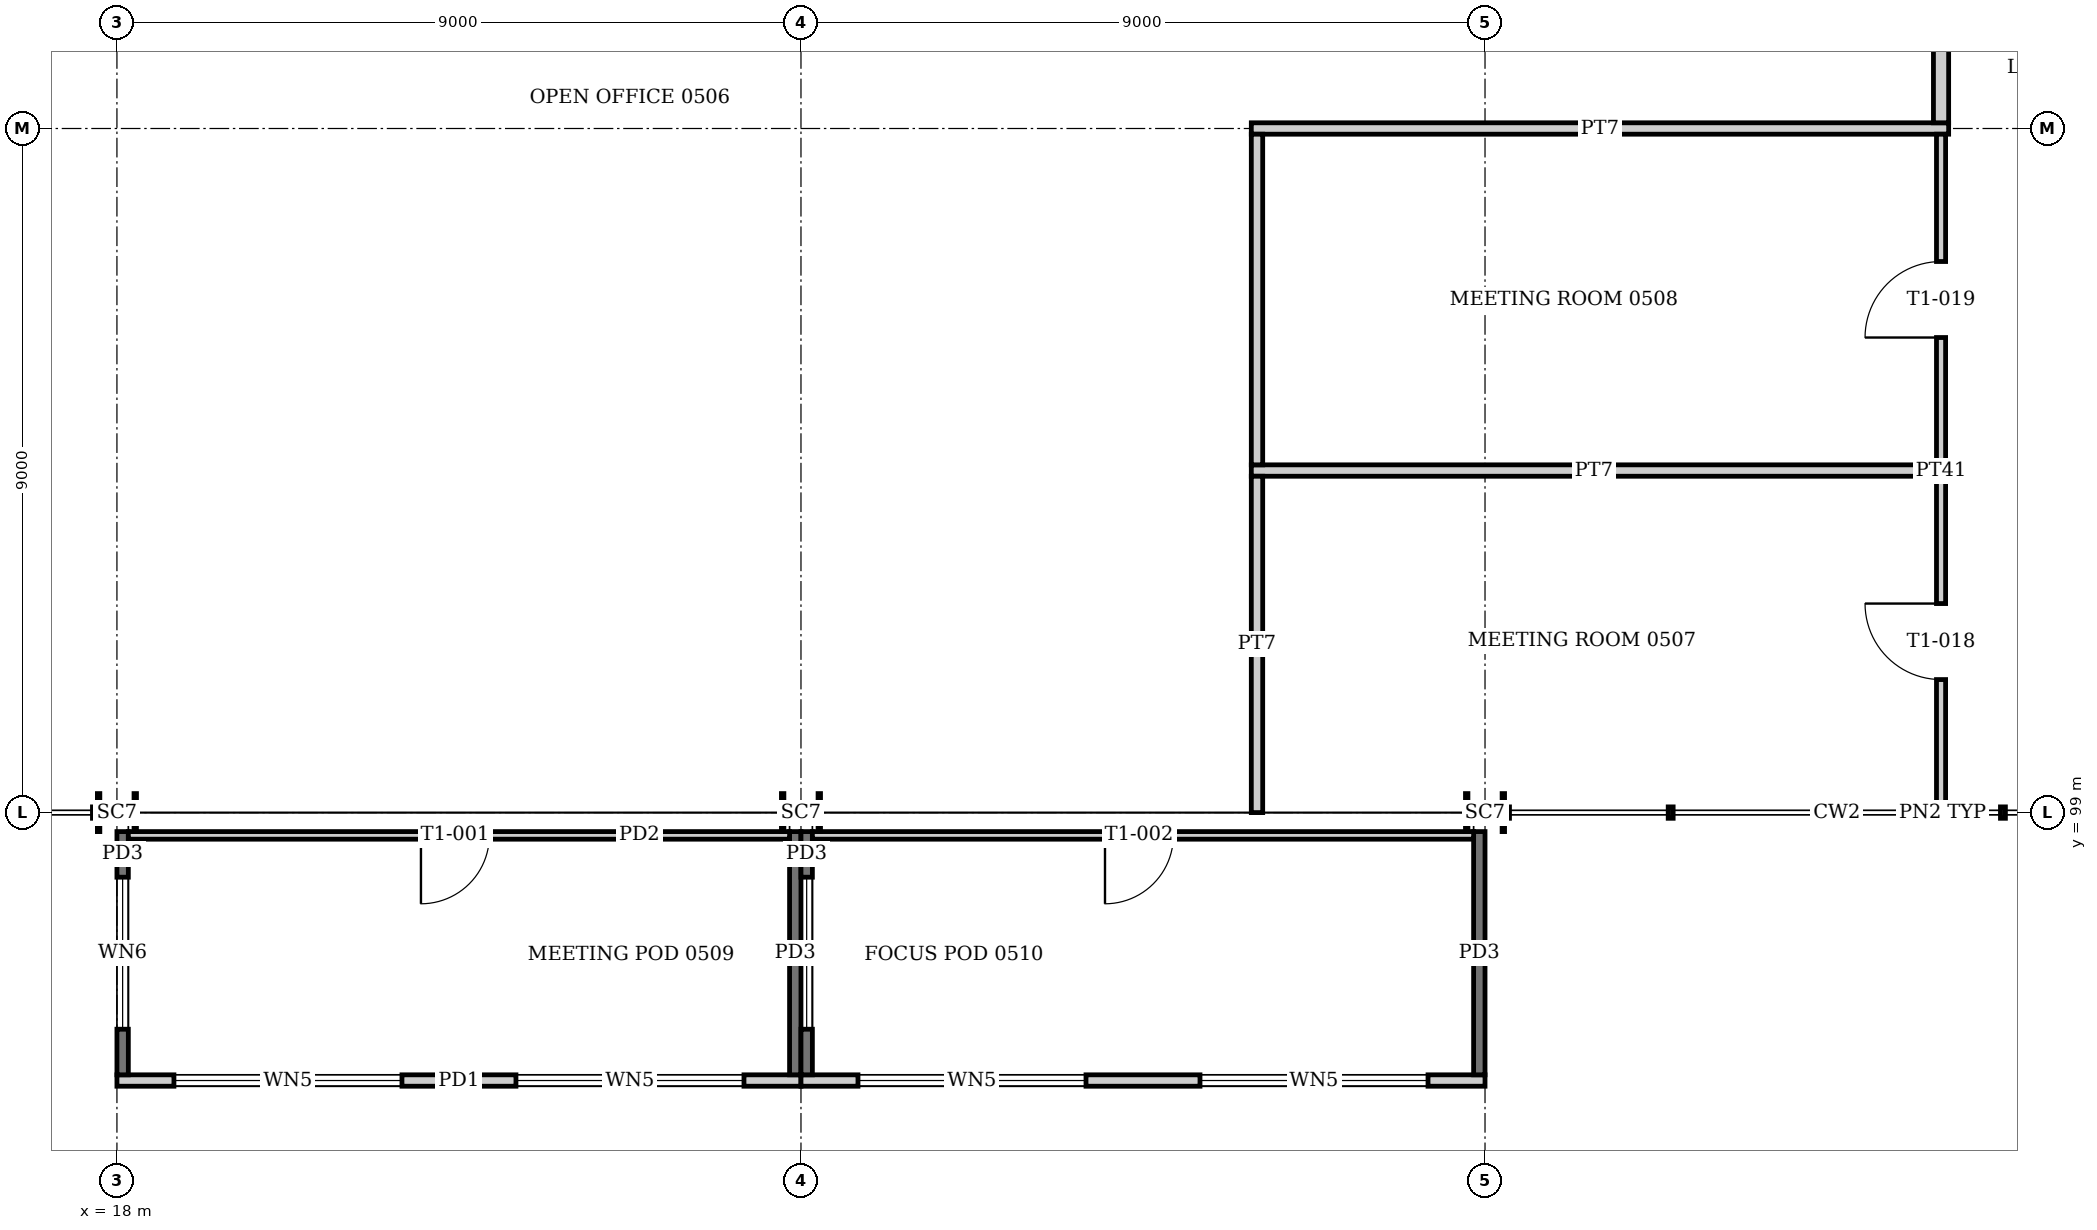
"""IFC4 building model, lengths in metres.
Left out: names, types, materials, properties, quantities, classifications, styles, units other than length and angle.
Written with IfcOpenShell. Run it as: python <this file> out.ifc"""

import sys

from ifc_helpers import new_model, si_unit, direction, frame, frame_2d, origin, origin_2d, place, context, subcontext, project, spatial, rectangle, i_section, extrude, element, fill, save


model = new_model("IFC4")
c1 = context("Model", 3, precision=1e-05, world=origin(), true_north=direction((0.0, 1.0)))
c2 = subcontext(c1, "Body", "Model", "MODEL_VIEW")
j1 = project(units=[si_unit("LENGTHUNIT", "METRE"), si_unit("PLANEANGLEUNIT", "RADIAN")], contexts=[c1])
p1 = place(None, origin())
s1 = spatial("IfcSite", under=j1, at=p1, CompositionType="ELEMENT")
p2 = place(p1, origin())
s2 = spatial("IfcBuilding", under=s1, at=p2, CompositionType="ELEMENT")
p3 = place(p2, frame((0.0, 0.0, 23.2)))
s3 = spatial("IfcBuildingStorey", under=s2, at=p3, CompositionType="ELEMENT", Elevation=23.2)
for number, where, z_axis, x_axis in (
    (1, (18.0, 99.0, 0.0), (0.0, 0.0, 1.0), (0.0, 1.0, 0.0)),
    (2, (27.0, 99.0, 0.0), (0.0, 0.0, 1.0), (0.0, 1.0, 0.0)),
    (3, (36.0, 99.0, 0.0), (0.0, 0.0, 1.0), (0.0, 1.0, 0.0)),
):
    element("IfcColumn", number, at=place(p3, frame(where, z_axis=z_axis, x_axis=x_axis)), inside=s3, PredefinedType="COLUMN", context=c2, shape_type="SweptSolid", body=[
        extrude(i_section(OverallWidth=0.5, OverallDepth=0.514, WebThickness=0.025, FlangeThickness=0.032, at=origin_2d()), origin(), (0.0, 0.0, 1.0), 4.0),
    ])
p4 = place(p3, frame((18.0, 95.475, 0.0), z_axis=(0.0, 0.0, 1.0), x_axis=(1.0, 0.0, 0.0)))
e4 = element("IfcWall", 4, at=p4, inside=s3, PredefinedType="SOLIDWALL", context=c2, shape_type="SweptSolid", body=[
    extrude(rectangle(XDim=9.0, YDim=0.15, at=frame_2d((4.5, 0.0))), origin(), (0.0, 0.0, 1.0), 2.6),
])
p5 = place(p4, frame((0.75, 0.0, 0.9)))
e5 = element("IfcOpeningElement", 5, at=p5, cuts=e4, PredefinedType="OPENING", context=c2, shape_type="SweptSolid", body=[
    extrude(rectangle(XDim=3.0, YDim=1.4, at=frame_2d((1.5, 0.7))), frame((0.0, 0.085, 0.0), z_axis=(0.0, -1.0, 0.0), x_axis=(1.0, 0.0, 0.0)), (0.0, 0.0, 1.0), 0.17),
])
p6 = place(p4, frame((5.25, 0.0, 0.9)))
e6 = element("IfcOpeningElement", 6, at=p6, cuts=e4, PredefinedType="OPENING", context=c2, shape_type="SweptSolid", body=[
    extrude(rectangle(XDim=3.0, YDim=1.4, at=frame_2d((1.5, 0.7))), frame((0.0, 0.085, 0.0), z_axis=(0.0, -1.0, 0.0), x_axis=(1.0, 0.0, 0.0)), (0.0, 0.0, 1.0), 0.17),
])
p7 = place(p3, frame((18.075, 95.55, -0.15), z_axis=(0.0, 0.0, 1.0), x_axis=(0.0, 1.0, 0.0)))
e7 = element("IfcWall", 7, at=p7, inside=s3, PredefinedType="SOLIDWALL", context=c2, shape_type="SweptSolid", body=[
    extrude(rectangle(XDim=3.2, YDim=0.15, at=frame_2d((1.6, 0.0))), origin(), (0.0, 0.0, 1.0), 2.75),
])
p8 = place(p7, frame((0.6, 0.0, 1.05)))
e8 = element("IfcOpeningElement", 8, at=p8, cuts=e7, PredefinedType="OPENING", context=c2, shape_type="SweptSolid", body=[
    extrude(rectangle(XDim=2.0, YDim=1.4, at=frame_2d((1.0, 0.7))), frame((0.0, 0.085, 0.0), z_axis=(0.0, -1.0, 0.0), x_axis=(1.0, 0.0, 0.0)), (0.0, 0.0, 1.0), 0.17),
])
p9 = place(p3, frame((26.925, 95.55, -0.15), z_axis=(0.0, 0.0, 1.0), x_axis=(0.0, 1.0, 0.0)))
e9 = element("IfcWall", 9, at=p9, inside=s3, PredefinedType="SOLIDWALL", context=c2, shape_type="SweptSolid", body=[
    extrude(rectangle(XDim=3.2, YDim=0.15, at=frame_2d((1.6, 0.0))), origin(), (0.0, 0.0, 1.0), 2.75),
])
p10 = place(p3, frame((18.15, 98.7, 0.0), z_axis=(0.0, 0.0, 1.0), x_axis=(1.0, 0.0, 0.0)))
e10 = element("IfcWall", 10, at=p10, inside=s3, PredefinedType="PARTITIONING", context=c2, shape_type="SweptSolid", body=[
    extrude(rectangle(XDim=8.7, YDim=0.1, at=frame_2d((4.35, 0.0))), origin(), (0.0, 0.0, 1.0), 2.6),
])
p11 = place(p10, frame((3.85, 0.0, 0.0)))
e11 = element("IfcOpeningElement", 11, at=p11, cuts=e10, PredefinedType="OPENING", context=c2, shape_type="SweptSolid", body=[
    extrude(rectangle(XDim=0.9, YDim=2.1, at=frame_2d((0.45, 1.05))), frame((0.0, 0.06, 0.0), z_axis=(0.0, -1.0, 0.0), x_axis=(1.0, 0.0, 0.0)), (0.0, 0.0, 1.0), 0.12),
])
p12 = place(p3, frame((27.0, 95.475, 0.0), z_axis=(0.0, 0.0, 1.0), x_axis=(1.0, 0.0, 0.0)))
e12 = element("IfcWall", 12, at=p12, inside=s3, PredefinedType="SOLIDWALL", context=c2, shape_type="SweptSolid", body=[
    extrude(rectangle(XDim=9.0, YDim=0.15, at=frame_2d((4.5, 0.0))), origin(), (0.0, 0.0, 1.0), 2.6),
])
p13 = place(p12, frame((0.75, 0.0, 0.9)))
e13 = element("IfcOpeningElement", 13, at=p13, cuts=e12, PredefinedType="OPENING", context=c2, shape_type="SweptSolid", body=[
    extrude(rectangle(XDim=3.0, YDim=1.4, at=frame_2d((1.5, 0.7))), frame((0.0, 0.085, 0.0), z_axis=(0.0, -1.0, 0.0), x_axis=(1.0, 0.0, 0.0)), (0.0, 0.0, 1.0), 0.17),
])
p14 = place(p12, frame((5.25, 0.0, 0.9)))
e14 = element("IfcOpeningElement", 14, at=p14, cuts=e12, PredefinedType="OPENING", context=c2, shape_type="SweptSolid", body=[
    extrude(rectangle(XDim=3.0, YDim=1.4, at=frame_2d((1.5, 0.7))), frame((0.0, 0.085, 0.0), z_axis=(0.0, -1.0, 0.0), x_axis=(1.0, 0.0, 0.0)), (0.0, 0.0, 1.0), 0.17),
])
p15 = place(p3, frame((27.075, 95.55, -0.15), z_axis=(0.0, 0.0, 1.0), x_axis=(0.0, 1.0, 0.0)))
e15 = element("IfcWall", 15, at=p15, inside=s3, PredefinedType="SOLIDWALL", context=c2, shape_type="SweptSolid", body=[
    extrude(rectangle(XDim=3.2, YDim=0.15, at=frame_2d((1.6, 0.0))), origin(), (0.0, 0.0, 1.0), 2.75),
])
p16 = place(p15, frame((0.6, 0.0, 1.05)))
e16 = element("IfcOpeningElement", 16, at=p16, cuts=e15, PredefinedType="OPENING", context=c2, shape_type="SweptSolid", body=[
    extrude(rectangle(XDim=2.0, YDim=1.4, at=frame_2d((1.0, 0.7))), frame((0.0, 0.085, 0.0), z_axis=(0.0, -1.0, 0.0), x_axis=(1.0, 0.0, 0.0)), (0.0, 0.0, 1.0), 0.17),
])
p17 = place(p3, frame((35.925, 95.55, -0.15), z_axis=(0.0, 0.0, 1.0), x_axis=(0.0, 1.0, 0.0)))
e17 = element("IfcWall", 17, at=p17, inside=s3, PredefinedType="SOLIDWALL", context=c2, shape_type="SweptSolid", body=[
    extrude(rectangle(XDim=3.2, YDim=0.15, at=frame_2d((1.6, 0.0))), origin(), (0.0, 0.0, 1.0), 2.75),
])
p18 = place(p3, frame((27.15, 98.7, 0.0), z_axis=(0.0, 0.0, 1.0), x_axis=(1.0, 0.0, 0.0)))
e18 = element("IfcWall", 18, at=p18, inside=s3, PredefinedType="PARTITIONING", context=c2, shape_type="SweptSolid", body=[
    extrude(rectangle(XDim=8.7, YDim=0.1, at=frame_2d((4.35, 0.0))), origin(), (0.0, 0.0, 1.0), 2.6),
])
p19 = place(p18, frame((3.85, 0.0, 0.0)))
e19 = element("IfcOpeningElement", 19, at=p19, cuts=e18, PredefinedType="OPENING", context=c2, shape_type="SweptSolid", body=[
    extrude(rectangle(XDim=0.9, YDim=2.1, at=frame_2d((0.45, 1.05))), frame((0.0, 0.06, 0.0), z_axis=(0.0, -1.0, 0.0), x_axis=(1.0, 0.0, 0.0)), (0.0, 0.0, 1.0), 0.12),
])
p20 = place(p3, frame((32.925, 103.5, 0.0), z_axis=(0.0, 0.0, 1.0), x_axis=(1.0, 0.0, 0.0)))
e20 = element("IfcWall", 20, at=p20, inside=s3, PredefinedType="PARTITIONING", context=c2, shape_type="SweptSolid", body=[
    extrude(rectangle(XDim=9.015, YDim=0.15, at=frame_2d((4.507, 0.0))), origin(), (0.0, 0.0, 1.0), 3.05),
])
p21 = place(p3, frame((32.925, 108.0, 0.0), z_axis=(0.0, 0.0, 1.0), x_axis=(1.0, 0.0, 0.0)))
e21 = element("IfcWall", 21, at=p21, inside=s3, PredefinedType="PARTITIONING", context=c2, shape_type="SweptSolid", body=[
    extrude(rectangle(XDim=9.175, YDim=0.15, at=frame_2d((4.587, 0.0))), origin(), (0.0, 0.0, 1.0), 3.05),
])
p22 = place(p3, frame((33.0, 99.0, 0.0), z_axis=(0.0, 0.0, 1.0), x_axis=(0.0, 1.0, 0.0)))
e22 = element("IfcWall", 22, at=p22, inside=s3, PredefinedType="PARTITIONING", context=c2, shape_type="SweptSolid", body=[
    extrude(rectangle(XDim=4.425, YDim=0.15, at=frame_2d((2.212, 0.0))), origin(), (0.0, 0.0, 1.0), 3.04),
])
p23 = place(p3, frame((33.0, 103.575, 0.0), z_axis=(0.0, 0.0, 1.0), x_axis=(0.0, 1.0, 0.0)))
e23 = element("IfcWall", 23, at=p23, inside=s3, PredefinedType="PARTITIONING", context=c2, shape_type="SweptSolid", body=[
    extrude(rectangle(XDim=4.35, YDim=0.15, at=frame_2d((2.175, 0.0))), origin(), (0.0, 0.0, 1.0), 3.85),
])
p24 = place(p3, frame((42.0, 99.075, 0.0), z_axis=(0.0, 0.0, 1.0), x_axis=(0.0, 1.0, 0.0)))
e24 = element("IfcWall", 24, at=p24, inside=s3, PredefinedType="PARTITIONING", context=c2, shape_type="SweptSolid", body=[
    extrude(rectangle(XDim=8.85, YDim=0.12, at=frame_2d((4.425, 0.0))), origin(), (0.0, 0.0, 1.0), 3.85),
])
p25 = place(p24, frame((1.675, 0.0, 0.0)))
e25 = element("IfcOpeningElement", 25, at=p25, cuts=e24, PredefinedType="OPENING", context=c2, shape_type="SweptSolid", body=[
    extrude(rectangle(XDim=1.0, YDim=2.1, at=frame_2d((0.5, 1.05))), frame((0.0, 0.07, 0.0), z_axis=(0.0, -1.0, 0.0), x_axis=(1.0, 0.0, 0.0)), (0.0, 0.0, 1.0), 0.14),
])
p26 = place(p24, frame((6.175, 0.0, 0.0)))
e26 = element("IfcOpeningElement", 26, at=p26, cuts=e24, PredefinedType="OPENING", context=c2, shape_type="SweptSolid", body=[
    extrude(rectangle(XDim=1.0, YDim=2.1, at=frame_2d((0.5, 1.05))), frame((0.0, 0.07, 0.0), z_axis=(0.0, -1.0, 0.0), x_axis=(1.0, 0.0, 0.0)), (0.0, 0.0, 1.0), 0.14),
])
p27 = place(p3, frame((42.0, 108.075, 0.0), z_axis=(0.0, 0.0, 1.0), x_axis=(0.0, 1.0, 0.0)))
e27 = element("IfcWall", 27, at=p27, inside=s3, PredefinedType="PARTITIONING", context=c2, shape_type="SweptSolid", body=[
    extrude(rectangle(XDim=8.835, YDim=0.2, at=frame_2d((4.417, 0.0))), origin(), (0.0, 0.0, 1.0), 3.85),
])
p28 = place(p27, frame((3.525, 0.0, 0.0)))
e28 = element("IfcOpeningElement", 28, at=p28, cuts=e27, PredefinedType="OPENING", context=c2, shape_type="SweptSolid", body=[
    extrude(rectangle(XDim=1.8, YDim=2.1, at=frame_2d((0.9, 1.05))), frame((0.0, 0.11, 0.0), z_axis=(0.0, -1.0, 0.0), x_axis=(1.0, 0.0, 0.0)), (0.0, 0.0, 1.0), 0.22),
])
p29 = place(p5, origin())
e29 = element("IfcWindow", 29, at=p29, inside=s3, PartitioningType="SINGLE_PANEL", PredefinedType="WINDOW", context=c2, shape_type="SweptSolid", body=[
    extrude(rectangle(XDim=3.0, YDim=1.4, at=frame_2d((1.5, 0.7))), frame((0.0, 0.03, 0.0), z_axis=(0.0, -1.0, 0.0), x_axis=(1.0, 0.0, 0.0)), (0.0, 0.0, 1.0), 0.06),
])
fill(e5, e29)
p30 = place(p6, origin())
e30 = element("IfcWindow", 30, at=p30, inside=s3, PartitioningType="SINGLE_PANEL", PredefinedType="WINDOW", context=c2, shape_type="SweptSolid", body=[
    extrude(rectangle(XDim=3.0, YDim=1.4, at=frame_2d((1.5, 0.7))), frame((0.0, 0.03, 0.0), z_axis=(0.0, -1.0, 0.0), x_axis=(1.0, 0.0, 0.0)), (0.0, 0.0, 1.0), 0.06),
])
fill(e6, e30)
p31 = place(p8, origin())
e31 = element("IfcWindow", 31, at=p31, inside=s3, PartitioningType="SINGLE_PANEL", PredefinedType="WINDOW", context=c2, shape_type="SweptSolid", body=[
    extrude(rectangle(XDim=2.0, YDim=1.4, at=frame_2d((1.0, 0.7))), frame((0.0, 0.03, 0.0), z_axis=(0.0, -1.0, 0.0), x_axis=(1.0, 0.0, 0.0)), (0.0, 0.0, 1.0), 0.06),
])
fill(e8, e31)
p32 = place(p11, frame((0.9, 0.0, 0.0), z_axis=(0.0, 0.0, 1.0), x_axis=(-1.0, 0.0, 0.0)))
e32 = element("IfcDoor", 32, at=p32, inside=s3, OperationType="SINGLE_SWING_RIGHT", PredefinedType="DOOR", context=c2, shape_type="SweptSolid", body=[
    extrude(rectangle(XDim=0.9, YDim=2.1, at=frame_2d((0.45, 1.05))), frame((0.0, 0.025, 0.0), z_axis=(0.0, -1.0, 0.0), x_axis=(1.0, 0.0, 0.0)), (0.0, 0.0, 1.0), 0.05),
])
fill(e11, e32)
p33 = place(p13, origin())
e33 = element("IfcWindow", 33, at=p33, inside=s3, PartitioningType="SINGLE_PANEL", PredefinedType="WINDOW", context=c2, shape_type="SweptSolid", body=[
    extrude(rectangle(XDim=3.0, YDim=1.4, at=frame_2d((1.5, 0.7))), frame((0.0, 0.03, 0.0), z_axis=(0.0, -1.0, 0.0), x_axis=(1.0, 0.0, 0.0)), (0.0, 0.0, 1.0), 0.06),
])
fill(e13, e33)
p34 = place(p14, origin())
e34 = element("IfcWindow", 34, at=p34, inside=s3, PartitioningType="SINGLE_PANEL", PredefinedType="WINDOW", context=c2, shape_type="SweptSolid", body=[
    extrude(rectangle(XDim=3.0, YDim=1.4, at=frame_2d((1.5, 0.7))), frame((0.0, 0.03, 0.0), z_axis=(0.0, -1.0, 0.0), x_axis=(1.0, 0.0, 0.0)), (0.0, 0.0, 1.0), 0.06),
])
fill(e14, e34)
p35 = place(p16, origin())
e35 = element("IfcWindow", 35, at=p35, inside=s3, PartitioningType="SINGLE_PANEL", PredefinedType="WINDOW", context=c2, shape_type="SweptSolid", body=[
    extrude(rectangle(XDim=2.0, YDim=1.4, at=frame_2d((1.0, 0.7))), frame((0.0, 0.03, 0.0), z_axis=(0.0, -1.0, 0.0), x_axis=(1.0, 0.0, 0.0)), (0.0, 0.0, 1.0), 0.06),
])
fill(e16, e35)
p36 = place(p19, frame((0.9, 0.0, 0.0), z_axis=(0.0, 0.0, 1.0), x_axis=(-1.0, 0.0, 0.0)))
e36 = element("IfcDoor", 36, at=p36, inside=s3, OperationType="SINGLE_SWING_RIGHT", PredefinedType="DOOR", context=c2, shape_type="SweptSolid", body=[
    extrude(rectangle(XDim=0.9, YDim=2.1, at=frame_2d((0.45, 1.05))), frame((0.0, 0.025, 0.0), z_axis=(0.0, -1.0, 0.0), x_axis=(1.0, 0.0, 0.0)), (0.0, 0.0, 1.0), 0.05),
])
fill(e19, e36)
p37 = place(p25, origin())
e37 = element("IfcDoor", 37, at=p37, inside=s3, OperationType="SINGLE_SWING_RIGHT", PredefinedType="DOOR", context=c2, shape_type="SweptSolid", body=[
    extrude(rectangle(XDim=1.0, YDim=2.1, at=frame_2d((0.5, 1.05))), frame((0.0, 0.025, 0.0), z_axis=(0.0, -1.0, 0.0), x_axis=(1.0, 0.0, 0.0)), (0.0, 0.0, 1.0), 0.05),
])
fill(e25, e37)
p38 = place(p26, origin())
e38 = element("IfcDoor", 38, at=p38, inside=s3, OperationType="SINGLE_SWING_LEFT", PredefinedType="DOOR", context=c2, shape_type="SweptSolid", body=[
    extrude(rectangle(XDim=1.0, YDim=2.1, at=frame_2d((0.5, 1.05))), frame((0.0, 0.025, 0.0), z_axis=(0.0, -1.0, 0.0), x_axis=(1.0, 0.0, 0.0)), (0.0, 0.0, 1.0), 0.05),
])
fill(e26, e38)
save(model, sys.argv[1])
